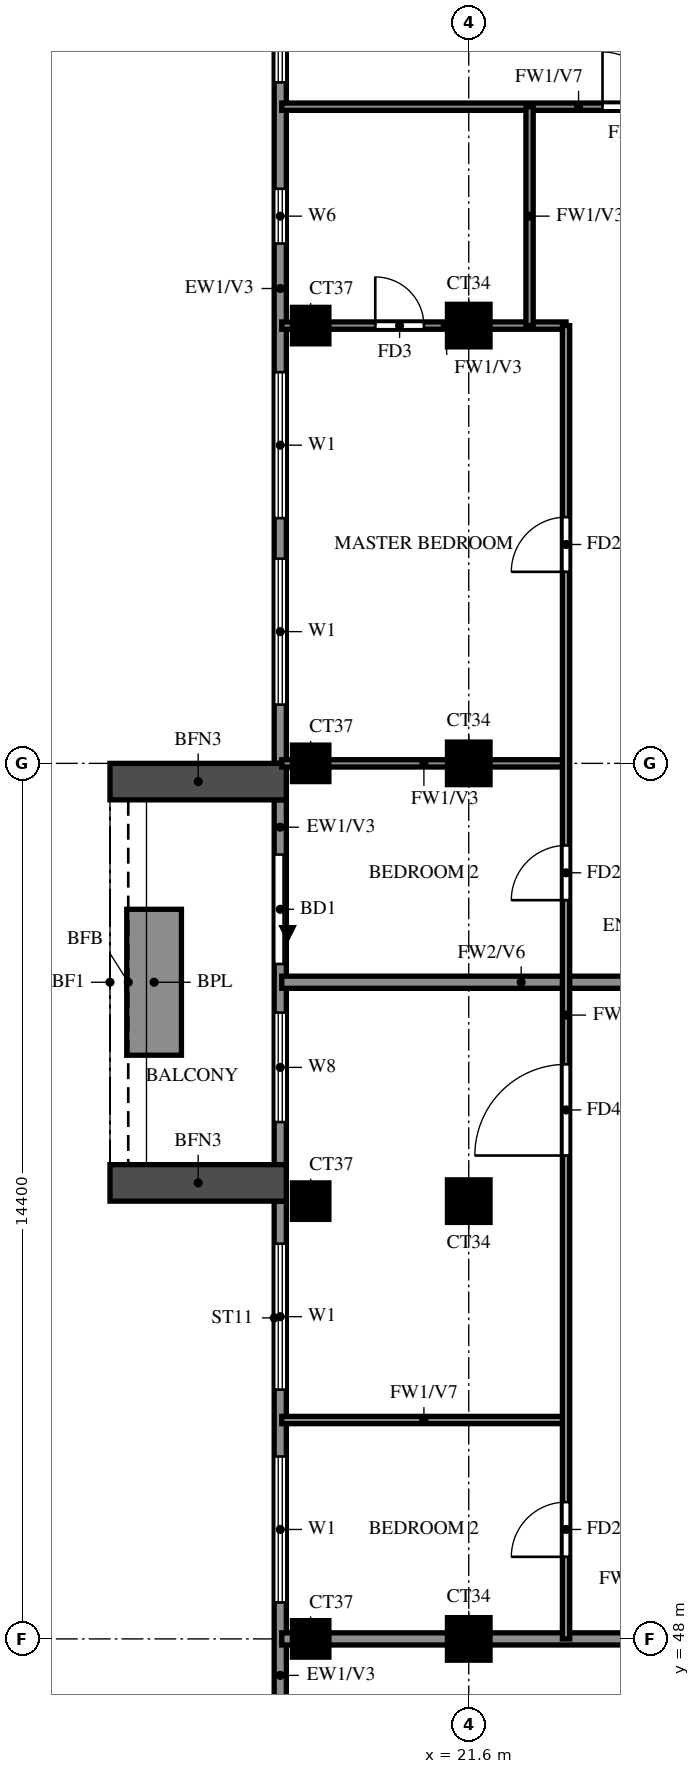
"""IFC4 building model, lengths in metres.
Left out: names, types, materials, properties, quantities, classifications, styles, units other than length and angle.
Written with IfcOpenShell. Run it as: python <this file> out.ifc"""

import sys

from ifc_helpers import new_model, si_unit, direction, frame, frame_2d, origin, origin_2d, place, context, subcontext, project, spatial, rectangle, extrude, source, transform, mapped, element, fill, save


model = new_model("IFC4")
c1 = context("Model", 3, precision=1e-05, world=origin(), true_north=direction((0.0, 1.0)))
c2 = subcontext(c1, "Body", "Model", "MODEL_VIEW")
j1 = project(units=[si_unit("LENGTHUNIT", "METRE"), si_unit("PLANEANGLEUNIT", "RADIAN")], contexts=[c1])
p1 = place(None, origin())
s1 = spatial("IfcSite", under=j1, at=p1, CompositionType="ELEMENT")
p2 = place(p1, origin())
s2 = spatial("IfcBuilding", under=s1, at=p2, CompositionType="ELEMENT")
p3 = place(p2, frame((0.0, 0.0, 257.0)))
s3 = spatial("IfcBuildingStorey", under=s2, at=p3, CompositionType="ELEMENT", Elevation=257.0)
m1 = source(origin(), c2, "Body", "SweptSolid", [
    extrude(rectangle(XDim=0.6, YDim=0.6, at=origin_2d()), origin(), (0.0, 0.0, 1.0), 3.22),
])
p4 = place(p3, frame((19.0, 48.0, 0.0), z_axis=(0.0, 0.0, 1.0), x_axis=(1.0, 0.0, 0.0)))
e1 = element("IfcColumn", 1, at=p4, inside=s3, PredefinedType="COLUMN", context=c2, shape_type="MappedRepresentation", body=[
    mapped(m1, transform((0.0, 0.0, 0.0))),
])
m2 = source(origin(), c2, "Body", "SweptSolid", [
    extrude(rectangle(XDim=0.7, YDim=0.7, at=origin_2d()), origin(), (0.0, 0.0, 1.0), 3.22),
])
p5 = place(p3, frame((21.6, 48.0, 0.0), z_axis=(0.0, 0.0, 1.0), x_axis=(1.0, 0.0, 0.0)))
e2 = element("IfcColumn", 2, at=p5, inside=s3, PredefinedType="COLUMN", context=c2, shape_type="MappedRepresentation", body=[
    mapped(m2, transform((0.0, 0.0, 0.0))),
])
p6 = place(p3, frame((19.0, 55.2, 0.0), z_axis=(0.0, 0.0, 1.0), x_axis=(1.0, 0.0, 0.0)))
e3 = element("IfcColumn", 3, at=p6, inside=s3, PredefinedType="COLUMN", context=c2, shape_type="MappedRepresentation", body=[
    mapped(m1, transform((0.0, 0.0, 0.0))),
])
p7 = place(p3, frame((21.6, 55.2, 0.0), z_axis=(0.0, 0.0, 1.0), x_axis=(1.0, 0.0, 0.0)))
e4 = element("IfcColumn", 4, at=p7, inside=s3, PredefinedType="COLUMN", context=c2, shape_type="MappedRepresentation", body=[
    mapped(m2, transform((0.0, 0.0, 0.0))),
])
p8 = place(p3, frame((19.0, 62.4, 0.0), z_axis=(0.0, 0.0, 1.0), x_axis=(1.0, 0.0, 0.0)))
e5 = element("IfcColumn", 5, at=p8, inside=s3, PredefinedType="COLUMN", context=c2, shape_type="MappedRepresentation", body=[
    mapped(m1, transform((0.0, 0.0, 0.0))),
])
p9 = place(p3, frame((21.6, 62.4, 0.0), z_axis=(0.0, 0.0, 1.0), x_axis=(1.0, 0.0, 0.0)))
e6 = element("IfcColumn", 6, at=p9, inside=s3, PredefinedType="COLUMN", context=c2, shape_type="MappedRepresentation", body=[
    mapped(m2, transform((0.0, 0.0, 0.0))),
])
p10 = place(p3, frame((19.0, 69.6, 0.0), z_axis=(0.0, 0.0, 1.0), x_axis=(1.0, 0.0, 0.0)))
e7 = element("IfcColumn", 7, at=p10, inside=s3, PredefinedType="COLUMN", context=c2, shape_type="MappedRepresentation", body=[
    mapped(m1, transform((0.0, 0.0, 0.0))),
])
p11 = place(p3, frame((21.6, 69.6, 0.0), z_axis=(0.0, 0.0, 1.0), x_axis=(1.0, 0.0, 0.0)))
e8 = element("IfcColumn", 8, at=p11, inside=s3, PredefinedType="COLUMN", context=c2, shape_type="MappedRepresentation", body=[
    mapped(m2, transform((0.0, 0.0, 0.0))),
])
p12 = place(p3, frame((18.5, 76.6, 0.0), z_axis=(0.0, 0.0, 1.0), x_axis=(0.0, -1.0, 0.0)))
e9 = element("IfcWall", 9, at=p12, inside=s3, PredefinedType="SOLIDWALL", context=c2, shape_type="SweptSolid", body=[
    extrude(rectangle(XDim=14.2, YDim=0.2, at=frame_2d((7.1, 0.0))), origin(), (0.0, 0.0, 1.0), 3.22),
])
p13 = place(p12, frame((7.767, 0.0, 0.6)))
e10 = element("IfcOpeningElement", 10, at=p13, cuts=e9, PredefinedType="OPENING", context=c2, shape_type="SweptSolid", body=[
    extrude(rectangle(XDim=2.4, YDim=2.4, at=frame_2d((1.2, 1.2))), frame((0.0, 0.11, 0.0), z_axis=(0.0, -1.0, 0.0), x_axis=(1.0, 0.0, 0.0)), (0.0, 0.0, 1.0), 0.22),
])
p14 = place(p12, frame((10.833, 0.0, 0.6)))
e11 = element("IfcOpeningElement", 11, at=p14, cuts=e9, PredefinedType="OPENING", context=c2, shape_type="SweptSolid", body=[
    extrude(rectangle(XDim=2.4, YDim=2.4, at=frame_2d((1.2, 1.2))), frame((0.0, 0.11, 0.0), z_axis=(0.0, -1.0, 0.0), x_axis=(1.0, 0.0, 0.0)), (0.0, 0.0, 1.0), 0.22),
])
p15 = place(p12, frame((4.75, 0.0, 1.5)))
e12 = element("IfcOpeningElement", 12, at=p15, cuts=e9, PredefinedType="OPENING", context=c2, shape_type="SweptSolid", body=[
    extrude(rectangle(XDim=0.9, YDim=0.9, at=frame_2d((0.45, 0.45))), frame((0.0, 0.11, 0.0), z_axis=(0.0, -1.0, 0.0), x_axis=(1.0, 0.0, 0.0)), (0.0, 0.0, 1.0), 0.22),
])
p16 = place(p12, frame((0.6, 0.0, 0.6)))
e13 = element("IfcOpeningElement", 13, at=p16, cuts=e9, PredefinedType="OPENING", context=c2, shape_type="SweptSolid", body=[
    extrude(rectangle(XDim=2.4, YDim=2.4, at=frame_2d((1.2, 1.2))), frame((0.0, 0.11, 0.0), z_axis=(0.0, -1.0, 0.0), x_axis=(1.0, 0.0, 0.0)), (0.0, 0.0, 1.0), 0.22),
])
p17 = place(p3, frame((18.5, 61.8, 0.0), z_axis=(0.0, 0.0, 1.0), x_axis=(0.0, -1.0, 0.0)))
e14 = element("IfcWall", 14, at=p17, inside=s3, PredefinedType="SOLIDWALL", context=c2, shape_type="SweptSolid", body=[
    extrude(rectangle(XDim=6.0, YDim=0.2, at=frame_2d((3.0, 0.0))), origin(), (0.0, 0.0, 1.0), 3.22),
])
p18 = place(p17, frame((0.9, 0.0, 0.0)))
e15 = element("IfcOpeningElement", 15, at=p18, cuts=e14, PredefinedType="OPENING", context=c2, shape_type="SweptSolid", body=[
    extrude(rectangle(XDim=1.8, YDim=2.4, at=frame_2d((0.9, 1.2))), frame((0.0, 0.11, 0.0), z_axis=(0.0, -1.0, 0.0), x_axis=(1.0, 0.0, 0.0)), (0.0, 0.0, 1.0), 0.22),
])
p19 = place(p17, frame((3.5, 0.0, 0.6)))
e16 = element("IfcOpeningElement", 16, at=p19, cuts=e14, PredefinedType="OPENING", context=c2, shape_type="SweptSolid", body=[
    extrude(rectangle(XDim=1.8, YDim=2.4, at=frame_2d((0.9, 1.2))), frame((0.0, 0.11, 0.0), z_axis=(0.0, -1.0, 0.0), x_axis=(1.0, 0.0, 0.0)), (0.0, 0.0, 1.0), 0.22),
])
p20 = place(p3, frame((18.5, 55.2, 0.0), z_axis=(0.0, 0.0, 1.0), x_axis=(0.0, -1.0, 0.0)))
e17 = element("IfcWall", 17, at=p20, inside=s3, PredefinedType="SOLIDWALL", context=c2, shape_type="SweptSolid", body=[
    extrude(rectangle(XDim=12.0, YDim=0.2, at=frame_2d((6.0, 0.0))), origin(), (0.0, 0.0, 1.0), 3.22),
])
p21 = place(p20, frame((8.3, 0.0, 0.6)))
e18 = element("IfcOpeningElement", 18, at=p21, cuts=e17, PredefinedType="OPENING", context=c2, shape_type="SweptSolid", body=[
    extrude(rectangle(XDim=2.4, YDim=2.4, at=frame_2d((1.2, 1.2))), frame((0.0, 0.11, 0.0), z_axis=(0.0, -1.0, 0.0), x_axis=(1.0, 0.0, 0.0)), (0.0, 0.0, 1.0), 0.22),
])
p22 = place(p20, frame((4.2, 0.0, 0.6)))
e19 = element("IfcOpeningElement", 19, at=p22, cuts=e17, PredefinedType="OPENING", context=c2, shape_type="SweptSolid", body=[
    extrude(rectangle(XDim=2.4, YDim=2.4, at=frame_2d((1.2, 1.2))), frame((0.0, 0.11, 0.0), z_axis=(0.0, -1.0, 0.0), x_axis=(1.0, 0.0, 0.0)), (0.0, 0.0, 1.0), 0.22),
])
p23 = place(p20, frame((0.7, 0.0, 0.6)))
e20 = element("IfcOpeningElement", 20, at=p23, cuts=e17, PredefinedType="OPENING", context=c2, shape_type="SweptSolid", body=[
    extrude(rectangle(XDim=2.4, YDim=2.4, at=frame_2d((1.2, 1.2))), frame((0.0, 0.11, 0.0), z_axis=(0.0, -1.0, 0.0), x_axis=(1.0, 0.0, 0.0)), (0.0, 0.0, 1.0), 0.22),
])
for number, where, z_axis, x_axis in (
    (21, (18.6, 62.1, 0.0), (0.0, 0.0, 1.0), (-1.0, 0.0, 0.0)),
    (22, (18.6, 55.5, 0.0), (0.0, 0.0, 1.0), (-1.0, 0.0, 0.0)),
):
    element("IfcWall", number, at=place(p3, frame(where, z_axis=z_axis, x_axis=x_axis)), inside=s3, PredefinedType="SOLIDWALL", context=c2, shape_type="SweptSolid", body=[
        extrude(rectangle(XDim=2.9, YDim=0.6, at=frame_2d((1.45, 0.0))), origin(), (0.0, 0.0, 1.0), 2.85),
    ])
p24 = place(p3, frame((16.425, 60.0, 0.0), z_axis=(0.0, 0.0, 1.0), x_axis=(0.0, -1.0, 0.0)))
e23 = element("IfcWall", 23, at=p24, inside=s3, PredefinedType="SOLIDWALL", context=c2, shape_type="SweptSolid", body=[
    extrude(rectangle(XDim=2.4, YDim=0.9, at=frame_2d((1.2, 0.0))), origin(), (0.0, 0.0, 1.0), 0.9),
])
p25 = place(p3, frame((18.525, 48.0, 0.0), z_axis=(0.0, 0.0, 1.0), x_axis=(1.0, 0.0, 0.0)))
e24 = element("IfcWall", 24, at=p25, inside=s3, PredefinedType="SOLIDWALL", context=c2, shape_type="SweptSolid", body=[
    extrude(rectangle(XDim=15.075, YDim=0.2, at=frame_2d((7.538, 0.0))), origin(), (0.0, 0.0, 1.0), 3.22),
])
p26 = place(p3, frame((18.525, 58.8, 0.0), z_axis=(0.0, 0.0, 1.0), x_axis=(1.0, 0.0, 0.0)))
e25 = element("IfcWall", 25, at=p26, inside=s3, PredefinedType="SOLIDWALL", context=c2, shape_type="SweptSolid", body=[
    extrude(rectangle(XDim=7.875, YDim=0.2, at=frame_2d((3.938, 0.0))), origin(), (0.0, 0.0, 1.0), 2.32),
])
p27 = place(p3, frame((18.525, 51.6, 0.0), z_axis=(0.0, 0.0, 1.0), x_axis=(1.0, 0.0, 0.0)))
e26 = element("IfcWall", 26, at=p27, inside=s3, PredefinedType="PARTITIONING", context=c2, shape_type="SweptSolid", body=[
    extrude(rectangle(XDim=4.675, YDim=0.12, at=frame_2d((2.337, 0.0))), origin(), (0.0, 0.0, 1.0), 2.32),
])
p28 = place(p3, frame((18.525, 62.4, 0.0), z_axis=(0.0, 0.0, 1.0), x_axis=(1.0, 0.0, 0.0)))
e27 = element("IfcWall", 27, at=p28, inside=s3, PredefinedType="PARTITIONING", context=c2, shape_type="SweptSolid", body=[
    extrude(rectangle(XDim=4.675, YDim=0.12, at=frame_2d((2.337, 0.0))), origin(), (0.0, 0.0, 1.0), 3.22),
])
p29 = place(p3, frame((18.525, 69.6, 0.0), z_axis=(0.0, 0.0, 1.0), x_axis=(1.0, 0.0, 0.0)))
e28 = element("IfcWall", 28, at=p29, inside=s3, PredefinedType="PARTITIONING", context=c2, shape_type="SweptSolid", body=[
    extrude(rectangle(XDim=4.675, YDim=0.12, at=frame_2d((2.337, 0.0))), origin(), (0.0, 0.0, 1.0), 3.22),
])
p30 = place(p29, frame((1.538, 0.0, 0.0)))
e29 = element("IfcOpeningElement", 29, at=p30, cuts=e28, PredefinedType="OPENING", context=c2, shape_type="SweptSolid", body=[
    extrude(rectangle(XDim=0.8, YDim=2.1, at=frame_2d((0.4, 1.05))), frame((0.0, 0.07, 0.0), z_axis=(0.0, -1.0, 0.0), x_axis=(1.0, 0.0, 0.0)), (0.0, 0.0, 1.0), 0.14),
])
p31 = place(p3, frame((18.525, 73.2, 0.0), z_axis=(0.0, 0.0, 1.0), x_axis=(1.0, 0.0, 0.0)))
e30 = element("IfcWall", 30, at=p31, inside=s3, PredefinedType="PARTITIONING", context=c2, shape_type="SweptSolid", body=[
    extrude(rectangle(XDim=10.275, YDim=0.12, at=frame_2d((5.138, 0.0))), origin(), (0.0, 0.0, 1.0), 2.32),
])
p32 = place(p31, frame((5.275, 0.0, 0.0)))
e31 = element("IfcOpeningElement", 31, at=p32, cuts=e30, PredefinedType="OPENING", context=c2, shape_type="SweptSolid", body=[
    extrude(rectangle(XDim=0.9, YDim=2.1, at=frame_2d((0.45, 1.05))), frame((0.0, 0.07, 0.0), z_axis=(0.0, -1.0, 0.0), x_axis=(1.0, 0.0, 0.0)), (0.0, 0.0, 1.0), 0.14),
])
p33 = place(p3, frame((22.6, 69.6, 0.0), z_axis=(0.0, 0.0, 1.0), x_axis=(0.0, 1.0, 0.0)))
e32 = element("IfcWall", 32, at=p33, inside=s3, PredefinedType="PARTITIONING", context=c2, shape_type="SweptSolid", body=[
    extrude(rectangle(XDim=3.6, YDim=0.12, at=frame_2d((1.8, 0.0))), origin(), (0.0, 0.0, 1.0), 3.22),
])
p34 = place(p3, frame((23.2, 48.0, 0.0), z_axis=(0.0, 0.0, 1.0), x_axis=(0.0, 1.0, 0.0)))
e33 = element("IfcWall", 33, at=p34, inside=s3, PredefinedType="PARTITIONING", context=c2, shape_type="SweptSolid", body=[
    extrude(rectangle(XDim=21.6, YDim=0.12, at=frame_2d((10.8, 0.0))), origin(), (0.0, 0.0, 1.0), 3.22),
])
p35 = place(p34, frame((1.35, 0.0, 0.0)))
e34 = element("IfcOpeningElement", 34, at=p35, cuts=e33, PredefinedType="OPENING", context=c2, shape_type="SweptSolid", body=[
    extrude(rectangle(XDim=0.9, YDim=2.1, at=frame_2d((0.45, 1.05))), frame((0.0, 0.07, 0.0), z_axis=(0.0, -1.0, 0.0), x_axis=(1.0, 0.0, 0.0)), (0.0, 0.0, 1.0), 0.14),
])
p36 = place(p34, frame((7.95, 0.0, 0.0)))
e35 = element("IfcOpeningElement", 35, at=p36, cuts=e33, PredefinedType="OPENING", context=c2, shape_type="SweptSolid", body=[
    extrude(rectangle(XDim=1.5, YDim=2.1, at=frame_2d((0.75, 1.05))), frame((0.0, 0.07, 0.0), z_axis=(0.0, -1.0, 0.0), x_axis=(1.0, 0.0, 0.0)), (0.0, 0.0, 1.0), 0.14),
])
p37 = place(p34, frame((12.15, 0.0, 0.0)))
e36 = element("IfcOpeningElement", 36, at=p37, cuts=e33, PredefinedType="OPENING", context=c2, shape_type="SweptSolid", body=[
    extrude(rectangle(XDim=0.9, YDim=2.1, at=frame_2d((0.45, 1.05))), frame((0.0, 0.07, 0.0), z_axis=(0.0, -1.0, 0.0), x_axis=(1.0, 0.0, 0.0)), (0.0, 0.0, 1.0), 0.14),
])
p38 = place(p34, frame((17.55, 0.0, 0.0)))
e37 = element("IfcOpeningElement", 37, at=p38, cuts=e33, PredefinedType="OPENING", context=c2, shape_type="SweptSolid", body=[
    extrude(rectangle(XDim=0.9, YDim=2.1, at=frame_2d((0.45, 1.05))), frame((0.0, 0.07, 0.0), z_axis=(0.0, -1.0, 0.0), x_axis=(1.0, 0.0, 0.0)), (0.0, 0.0, 1.0), 0.14),
])
p39 = place(p13, origin())
e38 = element("IfcWindow", 38, at=p39, inside=s3, PartitioningType="DOUBLE_PANEL_VERTICAL", PredefinedType="WINDOW", context=c2, shape_type="SweptSolid", body=[
    extrude(rectangle(XDim=2.4, YDim=2.4, at=frame_2d((1.2, 1.2))), frame((0.0, 0.03, 0.0), z_axis=(0.0, -1.0, 0.0), x_axis=(1.0, 0.0, 0.0)), (0.0, 0.0, 1.0), 0.06),
])
fill(e10, e38)
p40 = place(p14, origin())
e39 = element("IfcWindow", 39, at=p40, inside=s3, PartitioningType="DOUBLE_PANEL_VERTICAL", PredefinedType="WINDOW", context=c2, shape_type="SweptSolid", body=[
    extrude(rectangle(XDim=2.4, YDim=2.4, at=frame_2d((1.2, 1.2))), frame((0.0, 0.03, 0.0), z_axis=(0.0, -1.0, 0.0), x_axis=(1.0, 0.0, 0.0)), (0.0, 0.0, 1.0), 0.06),
])
fill(e11, e39)
p41 = place(p15, origin())
e40 = element("IfcWindow", 40, at=p41, inside=s3, PartitioningType="SINGLE_PANEL", PredefinedType="WINDOW", context=c2, shape_type="SweptSolid", body=[
    extrude(rectangle(XDim=0.9, YDim=0.9, at=frame_2d((0.45, 0.45))), frame((0.0, 0.03, 0.0), z_axis=(0.0, -1.0, 0.0), x_axis=(1.0, 0.0, 0.0)), (0.0, 0.0, 1.0), 0.06),
])
fill(e12, e40)
p42 = place(p16, origin())
e41 = element("IfcWindow", 41, at=p42, inside=s3, PartitioningType="DOUBLE_PANEL_VERTICAL", PredefinedType="WINDOW", context=c2, shape_type="SweptSolid", body=[
    extrude(rectangle(XDim=2.4, YDim=2.4, at=frame_2d((1.2, 1.2))), frame((0.0, 0.03, 0.0), z_axis=(0.0, -1.0, 0.0), x_axis=(1.0, 0.0, 0.0)), (0.0, 0.0, 1.0), 0.06),
])
fill(e13, e41)
p43 = place(p18, origin())
e42 = element("IfcDoor", 42, at=p43, inside=s3, OperationType="DOUBLE_DOOR_SLIDING", PredefinedType="DOOR", context=c2, shape_type="SweptSolid", body=[
    extrude(rectangle(XDim=1.8, YDim=2.4, at=frame_2d((0.9, 1.2))), frame((0.0, 0.025, 0.0), z_axis=(0.0, -1.0, 0.0), x_axis=(1.0, 0.0, 0.0)), (0.0, 0.0, 1.0), 0.05),
])
fill(e15, e42)
p44 = place(p19, origin())
e43 = element("IfcWindow", 43, at=p44, inside=s3, PartitioningType="DOUBLE_PANEL_VERTICAL", PredefinedType="WINDOW", context=c2, shape_type="SweptSolid", body=[
    extrude(rectangle(XDim=1.8, YDim=2.4, at=frame_2d((0.9, 1.2))), frame((0.0, 0.03, 0.0), z_axis=(0.0, -1.0, 0.0), x_axis=(1.0, 0.0, 0.0)), (0.0, 0.0, 1.0), 0.06),
])
fill(e16, e43)
p45 = place(p22, origin())
e44 = element("IfcWindow", 44, at=p45, inside=s3, PartitioningType="DOUBLE_PANEL_VERTICAL", PredefinedType="WINDOW", context=c2, shape_type="SweptSolid", body=[
    extrude(rectangle(XDim=2.4, YDim=2.4, at=frame_2d((1.2, 1.2))), frame((0.0, 0.03, 0.0), z_axis=(0.0, -1.0, 0.0), x_axis=(1.0, 0.0, 0.0)), (0.0, 0.0, 1.0), 0.06),
])
fill(e19, e44)
p46 = place(p23, origin())
e45 = element("IfcWindow", 45, at=p46, inside=s3, PartitioningType="DOUBLE_PANEL_VERTICAL", PredefinedType="WINDOW", context=c2, shape_type="SweptSolid", body=[
    extrude(rectangle(XDim=2.4, YDim=2.4, at=frame_2d((1.2, 1.2))), frame((0.0, 0.03, 0.0), z_axis=(0.0, -1.0, 0.0), x_axis=(1.0, 0.0, 0.0)), (0.0, 0.0, 1.0), 0.06),
])
fill(e20, e45)
p47 = place(p35, origin())
e46 = element("IfcDoor", 46, at=p47, inside=s3, OperationType="SINGLE_SWING_LEFT", PredefinedType="DOOR", context=c2, shape_type="SweptSolid", body=[
    extrude(rectangle(XDim=0.9, YDim=2.1, at=frame_2d((0.45, 1.05))), frame((0.0, 0.025, 0.0), z_axis=(0.0, -1.0, 0.0), x_axis=(1.0, 0.0, 0.0)), (0.0, 0.0, 1.0), 0.05),
])
fill(e34, e46)
p48 = place(p36, origin())
e47 = element("IfcDoor", 47, at=p48, inside=s3, OperationType="SINGLE_SWING_RIGHT", PredefinedType="DOOR", context=c2, shape_type="SweptSolid", body=[
    extrude(rectangle(XDim=1.5, YDim=2.1, at=frame_2d((0.75, 1.05))), frame((0.0, 0.025, 0.0), z_axis=(0.0, -1.0, 0.0), x_axis=(1.0, 0.0, 0.0)), (0.0, 0.0, 1.0), 0.05),
])
fill(e35, e47)
p49 = place(p37, origin())
e48 = element("IfcDoor", 48, at=p49, inside=s3, OperationType="SINGLE_SWING_RIGHT", PredefinedType="DOOR", context=c2, shape_type="SweptSolid", body=[
    extrude(rectangle(XDim=0.9, YDim=2.1, at=frame_2d((0.45, 1.05))), frame((0.0, 0.025, 0.0), z_axis=(0.0, -1.0, 0.0), x_axis=(1.0, 0.0, 0.0)), (0.0, 0.0, 1.0), 0.05),
])
fill(e36, e48)
p50 = place(p38, origin())
e49 = element("IfcDoor", 49, at=p50, inside=s3, OperationType="SINGLE_SWING_LEFT", PredefinedType="DOOR", context=c2, shape_type="SweptSolid", body=[
    extrude(rectangle(XDim=0.9, YDim=2.1, at=frame_2d((0.45, 1.05))), frame((0.0, 0.025, 0.0), z_axis=(0.0, -1.0, 0.0), x_axis=(1.0, 0.0, 0.0)), (0.0, 0.0, 1.0), 0.05),
])
fill(e37, e49)
p51 = place(p30, origin())
e50 = element("IfcDoor", 50, at=p51, inside=s3, OperationType="SINGLE_SWING_RIGHT", PredefinedType="DOOR", context=c2, shape_type="SweptSolid", body=[
    extrude(rectangle(XDim=0.8, YDim=2.1, at=frame_2d((0.4, 1.05))), frame((0.0, 0.025, 0.0), z_axis=(0.0, -1.0, 0.0), x_axis=(1.0, 0.0, 0.0)), (0.0, 0.0, 1.0), 0.05),
])
fill(e29, e50)
p52 = place(p32, origin())
e51 = element("IfcDoor", 51, at=p52, inside=s3, OperationType="SINGLE_SWING_RIGHT", PredefinedType="DOOR", context=c2, shape_type="SweptSolid", body=[
    extrude(rectangle(XDim=0.9, YDim=2.1, at=frame_2d((0.45, 1.05))), frame((0.0, 0.025, 0.0), z_axis=(0.0, -1.0, 0.0), x_axis=(1.0, 0.0, 0.0)), (0.0, 0.0, 1.0), 0.05),
])
fill(e31, e51)
save(model, sys.argv[1])
